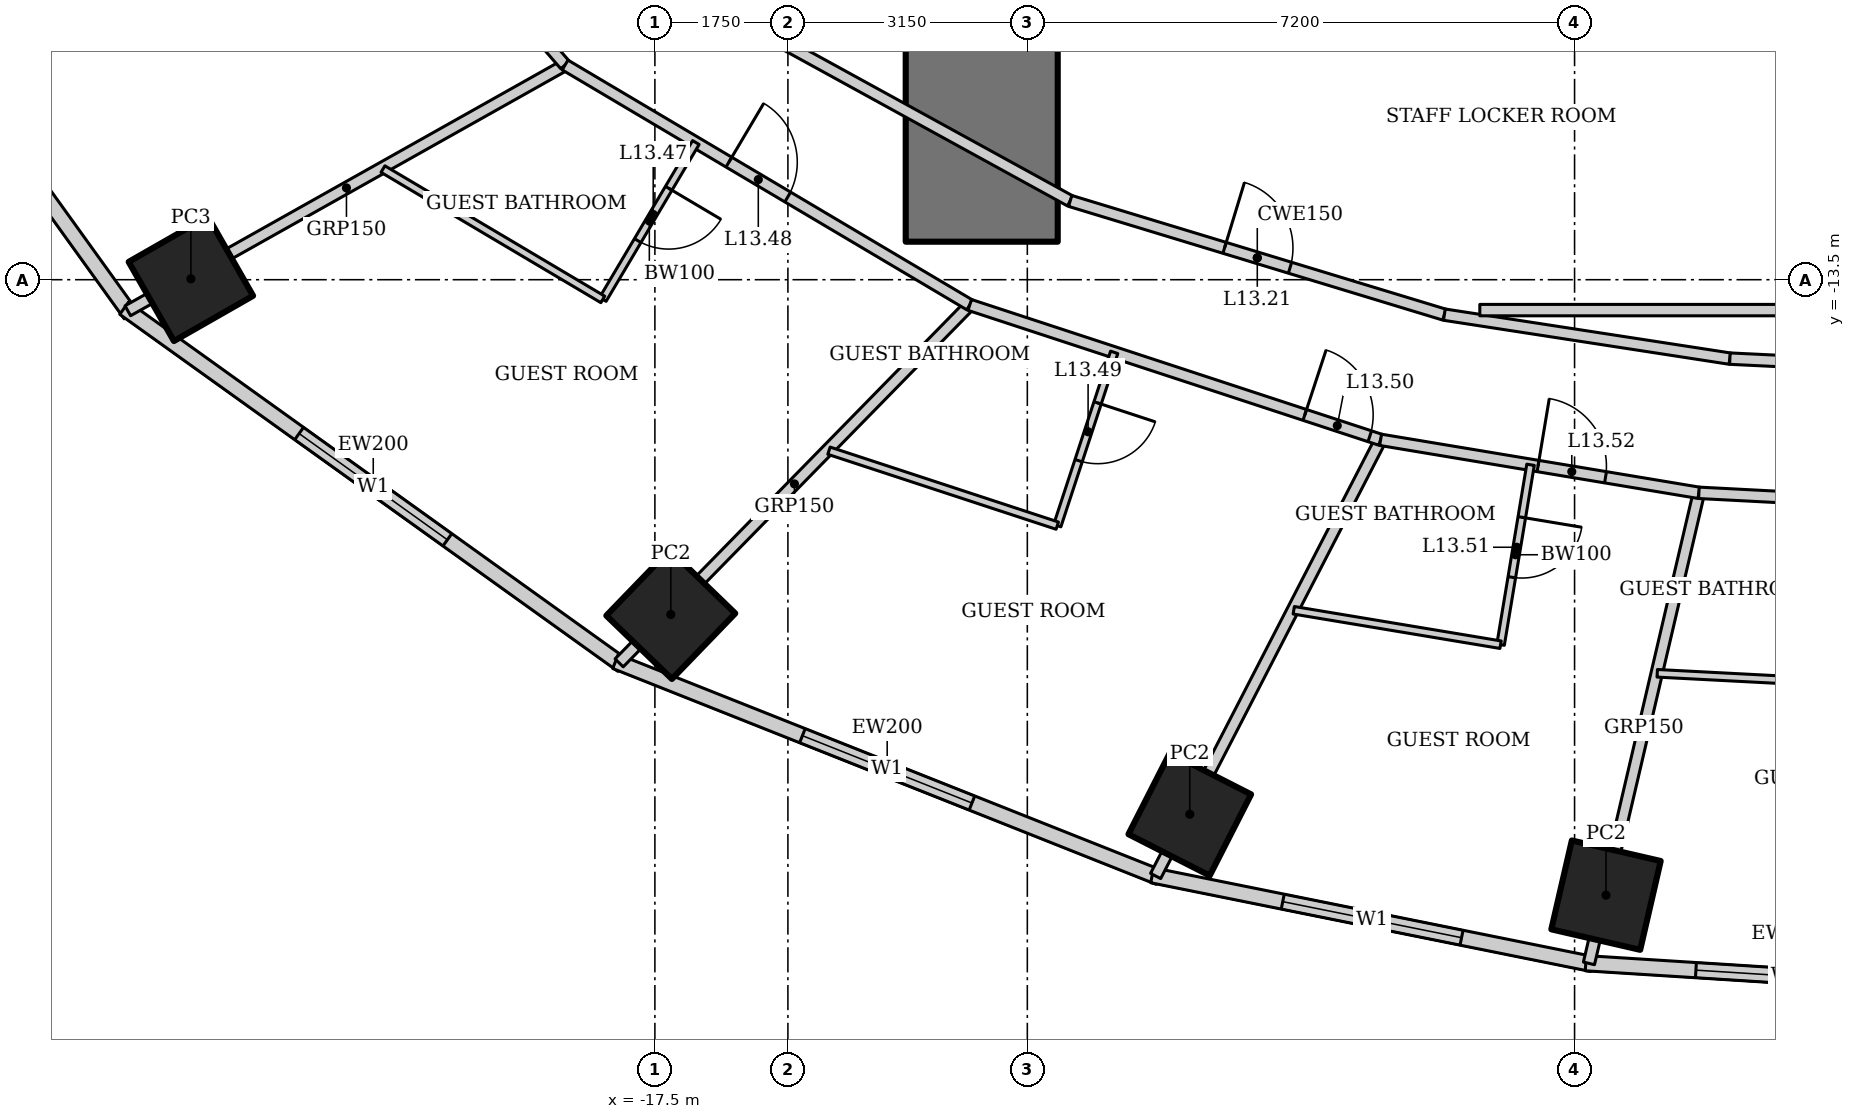
"""IFC4 building model, lengths in metres.
Left out: names, types, materials, properties, quantities, classifications, styles, units other than length and angle.
Written with IfcOpenShell. Run it as: python <this file> out.ifc"""

import sys

from ifc_helpers import new_model, si_unit, direction, frame, frame_2d, origin, origin_2d, place, context, subcontext, project, spatial, rectangle, hollow_rectangle, extrude, element, fill, save


model = new_model("IFC4")
c1 = context("Model", 3, precision=1e-05, world=origin(), true_north=direction((0.0, 1.0)))
c2 = subcontext(c1, "Body", "Model", "MODEL_VIEW")
j1 = project(units=[si_unit("LENGTHUNIT", "METRE"), si_unit("PLANEANGLEUNIT", "RADIAN")], contexts=[c1])
p1 = place(None, origin())
s1 = spatial("IfcSite", under=j1, at=p1, CompositionType="ELEMENT")
p2 = place(p1, origin())
s2 = spatial("IfcBuilding", under=s1, at=p2, CompositionType="ELEMENT")
p3 = place(p2, frame((0.0, 0.0, 62.2)))
s3 = spatial("IfcBuildingStorey", under=s2, at=p3, CompositionType="ELEMENT", Elevation=62.2)
p4 = place(p3, frame((-23.605, -13.489, 0.0), z_axis=(0.0, 0.0, 1.0), x_axis=(0.86824298017, 0.496139221777, 0.0)))
e1 = element("IfcColumn", 1, at=p4, inside=s3, PredefinedType="COLUMN", context=c2, shape_type="SweptSolid", body=[
    extrude(hollow_rectangle(XDim=1.2, YDim=1.2, WallThickness=0.12, at=origin_2d()), origin(), (0.0, 0.0, 1.0), 3.6),
])
for number, where, z_axis, x_axis in (
    (2, (-17.291, -17.905, 0.0), (0.0, 0.0, 1.0), (0.695, 0.719, 0.0)),
    (3, (-10.463, -20.534, 0.0), (0.0, 0.0, 1.0), (0.454, 0.891, 0.0)),
    (4, (-4.986, -21.598, 0.0), (0.0, 0.0, 1.0), (0.225, 0.974, 0.0)),
):
    element("IfcColumn", number, at=place(p3, frame(where, z_axis=z_axis, x_axis=x_axis)), inside=s3, PredefinedType="COLUMN", context=c2, shape_type="SweptSolid", body=[
        extrude(hollow_rectangle(XDim=1.2, YDim=1.2, WallThickness=0.1, at=origin_2d()), origin(), (0.0, 0.0, 1.0), 3.6),
    ])
p5 = place(p3, frame((-13.2, 13.0, 0.0), z_axis=(0.0, 0.0, 1.0), x_axis=(0.0, -1.0, 0.0)))
e5 = element("IfcWall", 5, at=p5, inside=s3, PredefinedType="SHEAR", context=c2, shape_type="SweptSolid", body=[
    extrude(rectangle(XDim=26.0, YDim=2.0, at=frame_2d((13.0, 0.0))), origin(), (0.0, 0.0, 1.0), 3.6),
])
p6 = place(p5, frame((12.1, 0.0, 0.0)))
e6 = element("IfcOpeningElement", 6, at=p6, cuts=e5, PredefinedType="OPENING", context=c2, shape_type="SweptSolid", body=[
    extrude(rectangle(XDim=1.8, YDim=2.1, at=frame_2d((0.9, 1.05))), frame((0.0, 1.01, 0.0), z_axis=(0.0, -1.0, 0.0), x_axis=(1.0, 0.0, 0.0)), (0.0, 0.0, 1.0), 2.02),
])
p7 = place(p3, frame((-29.26, -7.2, 0.0), z_axis=(0.0, 0.0, 1.0), x_axis=(0.583937613703, -0.811798536155, 0.0)))
e7 = element("IfcWall", 7, at=p7, inside=s3, PredefinedType="SOLIDWALL", context=c2, shape_type="SweptSolid", body=[
    extrude(rectangle(XDim=8.323, YDim=0.2, at=frame_2d((4.162, 0.0))), origin(), (0.0, 0.0, 1.0), 3.45),
])
p8 = place(p7, frame((2.961, 0.0, 0.5)))
e8 = element("IfcOpeningElement", 8, at=p8, cuts=e7, PredefinedType="OPENING", context=c2, shape_type="SweptSolid", body=[
    extrude(rectangle(XDim=2.4, YDim=2.2, at=frame_2d((1.2, 1.1))), frame((0.0, 0.11, 0.0), z_axis=(0.0, -1.0, 0.0), x_axis=(1.0, 0.0, 0.0)), (0.0, 0.0, 1.0), 0.22),
])
p9 = place(p3, frame((-24.482, -13.875, 0.0), z_axis=(0.0, 0.0, 1.0), x_axis=(0.812791321576, -0.582554948112, 0.0)))
e9 = element("IfcWall", 9, at=p9, inside=s3, PredefinedType="SOLIDWALL", context=c2, shape_type="SweptSolid", body=[
    extrude(rectangle(XDim=8.063, YDim=0.2, at=frame_2d((4.032, 0.0))), origin(), (0.0, 0.0, 1.0), 3.45),
])
p10 = place(p9, frame((2.832, 0.0, 0.5)))
e10 = element("IfcOpeningElement", 10, at=p10, cuts=e9, PredefinedType="OPENING", context=c2, shape_type="SweptSolid", body=[
    extrude(rectangle(XDim=2.4, YDim=2.2, at=frame_2d((1.2, 1.1))), frame((0.0, 0.11, 0.0), z_axis=(0.0, -1.0, 0.0), x_axis=(1.0, 0.0, 0.0)), (0.0, 0.0, 1.0), 0.22),
])
p11 = place(p3, frame((-18.018, -18.523, 0.0), z_axis=(0.0, 0.0, 1.0), x_axis=(0.929358351251, -0.369178892895, 0.0)))
e11 = element("IfcWall", 11, at=p11, inside=s3, PredefinedType="SOLIDWALL", context=c2, shape_type="SweptSolid", body=[
    extrude(rectangle(XDim=7.692, YDim=0.2, at=frame_2d((3.846, 0.0))), origin(), (0.0, 0.0, 1.0), 3.45),
])
p12 = place(p11, frame((2.646, 0.0, 0.5)))
e12 = element("IfcOpeningElement", 12, at=p12, cuts=e11, PredefinedType="OPENING", context=c2, shape_type="SweptSolid", body=[
    extrude(rectangle(XDim=2.4, YDim=2.2, at=frame_2d((1.2, 1.1))), frame((0.0, 0.11, 0.0), z_axis=(0.0, -1.0, 0.0), x_axis=(1.0, 0.0, 0.0)), (0.0, 0.0, 1.0), 0.22),
])
p13 = place(p3, frame((-10.957, -21.337, 0.0), z_axis=(0.0, 0.0, 1.0), x_axis=(0.980251657452, -0.197754110105, 0.0)))
e13 = element("IfcWall", 13, at=p13, inside=s3, PredefinedType="SOLIDWALL", context=c2, shape_type="SweptSolid", body=[
    extrude(rectangle(XDim=5.904, YDim=0.2, at=frame_2d((2.952, 0.0))), origin(), (0.0, 0.0, 1.0), 3.45),
])
p14 = place(p13, frame((1.752, 0.0, 0.5)))
e14 = element("IfcOpeningElement", 14, at=p14, cuts=e13, PredefinedType="OPENING", context=c2, shape_type="SweptSolid", body=[
    extrude(rectangle(XDim=2.4, YDim=2.2, at=frame_2d((1.2, 1.1))), frame((0.0, 0.11, 0.0), z_axis=(0.0, -1.0, 0.0), x_axis=(1.0, 0.0, 0.0)), (0.0, 0.0, 1.0), 0.22),
])
p15 = place(p3, frame((-5.253, -22.493, 0.0), z_axis=(0.0, 0.0, 1.0), x_axis=(0.998018582375, -0.062919863585, 0.0)))
e15 = element("IfcWall", 15, at=p15, inside=s3, PredefinedType="SOLIDWALL", context=c2, shape_type="SweptSolid", body=[
    extrude(rectangle(XDim=5.304, YDim=0.2, at=frame_2d((2.652, 0.0))), origin(), (0.0, 0.0, 1.0), 3.45),
])
p16 = place(p15, frame((1.452, 0.0, 0.5)))
e16 = element("IfcOpeningElement", 16, at=p16, cuts=e15, PredefinedType="OPENING", context=c2, shape_type="SweptSolid", body=[
    extrude(rectangle(XDim=2.4, YDim=2.2, at=frame_2d((1.2, 1.1))), frame((0.0, 0.11, 0.0), z_axis=(0.0, -1.0, 0.0), x_axis=(1.0, 0.0, 0.0)), (0.0, 0.0, 1.0), 0.22),
])
p17 = place(p3, frame((-24.435, -13.909, 0.0), z_axis=(0.0, 0.0, 1.0), x_axis=(0.871747379892, 0.489955616001, 0.0)))
e17 = element("IfcWall", 17, at=p17, inside=s3, PredefinedType="PARTITIONING", context=c2, shape_type="SweptSolid", body=[
    extrude(rectangle(XDim=6.6, YDim=0.15, at=frame_2d((3.3, 0.0))), origin(), (0.0, 0.0, 1.0), 2.693),
])
p18 = place(p3, frame((-17.97, -18.542, 0.0), z_axis=(0.0, 0.0, 1.0), x_axis=(0.699736251994, 0.714401272147, 0.0)))
e18 = element("IfcWall", 18, at=p18, inside=s3, PredefinedType="PARTITIONING", context=c2, shape_type="SweptSolid", body=[
    extrude(rectangle(XDim=6.593, YDim=0.15, at=frame_2d((3.296, 0.0))), origin(), (0.0, 0.0, 1.0), 2.528),
])
p19 = place(p3, frame((-10.912, -21.346, 0.0), z_axis=(0.0, 0.0, 1.0), x_axis=(0.458384799126, 0.888753833145, 0.0)))
e19 = element("IfcWall", 19, at=p19, inside=s3, PredefinedType="PARTITIONING", context=c2, shape_type="SweptSolid", body=[
    extrude(rectangle(XDim=6.457, YDim=0.15, at=frame_2d((3.229, 0.0))), origin(), (0.0, 0.0, 1.0), 2.528),
])
p20 = place(p3, frame((-5.211, -22.496, 0.0), z_axis=(0.0, 0.0, 1.0), x_axis=(0.227536694087, 0.973769507042, 0.0)))
e20 = element("IfcWall", 20, at=p20, inside=s3, PredefinedType="PARTITIONING", context=c2, shape_type="SweptSolid", body=[
    extrude(rectangle(XDim=6.358, YDim=0.15, at=frame_2d((3.179, 0.0))), origin(), (0.0, 0.0, 1.0), 2.767),
])
p21 = place(p3, frame((-22.976, -5.729, 0.0), z_axis=(0.0, 0.0, 1.0), x_axis=(0.655599989166, -0.755108372491, 0.0)))
e21 = element("IfcWall", 21, at=p21, inside=s3, PredefinedType="PARTITIONING", context=c2, shape_type="SweptSolid", body=[
    extrude(rectangle(XDim=6.551, YDim=0.15, at=frame_2d((3.275, 0.0))), origin(), (0.0, 0.0, 1.0), 3.45),
])
p22 = place(p21, frame((2.1, 0.0, 0.0)))
e22 = element("IfcOpeningElement", 22, at=p22, cuts=e21, PredefinedType="OPENING", context=c2, shape_type="SweptSolid", body=[
    extrude(rectangle(XDim=0.9, YDim=2.1, at=frame_2d((0.45, 1.05))), frame((0.0, 0.085, 0.0), z_axis=(0.0, -1.0, 0.0), x_axis=(1.0, 0.0, 0.0)), (0.0, 0.0, 1.0), 0.17),
])
p23 = place(p3, frame((-18.681, -10.675, 0.0), z_axis=(0.0, 0.0, 1.0), x_axis=(0.860147339762, -0.510045639036, 0.0)))
e23 = element("IfcWall", 23, at=p23, inside=s3, PredefinedType="PARTITIONING", context=c2, shape_type="SweptSolid", body=[
    extrude(rectangle(XDim=6.19, YDim=0.15, at=frame_2d((3.095, 0.0))), origin(), (0.0, 0.0, 1.0), 3.45),
])
p24 = place(p23, frame((2.505, 0.0, 0.0)))
e24 = element("IfcOpeningElement", 24, at=p24, cuts=e23, PredefinedType="OPENING", context=c2, shape_type="SweptSolid", body=[
    extrude(rectangle(XDim=0.9, YDim=2.1, at=frame_2d((0.45, 1.05))), frame((0.0, 0.085, 0.0), z_axis=(0.0, -1.0, 0.0), x_axis=(1.0, 0.0, 0.0)), (0.0, 0.0, 1.0), 0.17),
])
p25 = place(p3, frame((-13.357, -13.832, 0.0), z_axis=(0.0, 0.0, 1.0), x_axis=(0.950106803111, -0.311924770869, 0.0)))
e25 = element("IfcWall", 25, at=p25, inside=s3, PredefinedType="PARTITIONING", context=c2, shape_type="SweptSolid", body=[
    extrude(rectangle(XDim=5.689, YDim=0.15, at=frame_2d((2.845, 0.0))), origin(), (0.0, 0.0, 1.0), 3.45),
])
p26 = place(p25, frame((4.639, 0.0, 0.0)))
e26 = element("IfcOpeningElement", 26, at=p26, cuts=e25, PredefinedType="OPENING", context=c2, shape_type="SweptSolid", body=[
    extrude(rectangle(XDim=0.9, YDim=2.1, at=frame_2d((0.45, 1.05))), frame((0.0, 0.085, 0.0), z_axis=(0.0, -1.0, 0.0), x_axis=(1.0, 0.0, 0.0)), (0.0, 0.0, 1.0), 0.17),
])
p27 = place(p3, frame((-7.952, -15.607, 0.0), z_axis=(0.0, 0.0, 1.0), x_axis=(0.98641101506, -0.164296407044, 0.0)))
e27 = element("IfcWall", 27, at=p27, inside=s3, PredefinedType="PARTITIONING", context=c2, shape_type="SweptSolid", body=[
    extrude(rectangle(XDim=4.245, YDim=0.15, at=frame_2d((2.123, 0.0))), origin(), (0.0, 0.0, 1.0), 3.45),
])
p28 = place(p27, frame((2.1, 0.0, 0.0)))
e28 = element("IfcOpeningElement", 28, at=p28, cuts=e27, PredefinedType="OPENING", context=c2, shape_type="SweptSolid", body=[
    extrude(rectangle(XDim=0.9, YDim=2.1, at=frame_2d((0.45, 1.05))), frame((0.0, 0.085, 0.0), z_axis=(0.0, -1.0, 0.0), x_axis=(1.0, 0.0, 0.0)), (0.0, 0.0, 1.0), 0.17),
])
p29 = place(p3, frame((-3.764, -16.304, 0.0), z_axis=(0.0, 0.0, 1.0), x_axis=(0.998649848759, -0.05194689186, 0.0)))
e29 = element("IfcWall", 29, at=p29, inside=s3, PredefinedType="PARTITIONING", context=c2, shape_type="SweptSolid", body=[
    extrude(rectangle(XDim=3.769, YDim=0.15, at=frame_2d((1.885, 0.0))), origin(), (0.0, 0.0, 1.0), 3.45),
])
p30 = place(p29, frame((2.1, 0.0, 0.0)))
e30 = element("IfcOpeningElement", 30, at=p30, cuts=e29, PredefinedType="OPENING", context=c2, shape_type="SweptSolid", body=[
    extrude(rectangle(XDim=0.9, YDim=2.1, at=frame_2d((0.45, 1.05))), frame((0.0, 0.085, 0.0), z_axis=(0.0, -1.0, 0.0), x_axis=(1.0, 0.0, 0.0)), (0.0, 0.0, 1.0), 0.17),
])
p31 = place(p3, frame((-17.021, -9.726, 0.0), z_axis=(0.0, 0.0, 1.0), x_axis=(0.876522084062, -0.481361647986, 0.0)))
e31 = element("IfcWall", 31, at=p31, inside=s3, PredefinedType="PARTITIONING", context=c2, shape_type="SweptSolid", body=[
    extrude(rectangle(XDim=5.687, YDim=0.15, at=frame_2d((2.844, 0.0))), origin(), (0.0, 0.0, 1.0), 3.45),
])
p32 = place(p3, frame((-12.036, -12.464, 0.0), z_axis=(0.0, 0.0, 1.0), x_axis=(0.956795045135, -0.290763205385, 0.0)))
e32 = element("IfcWall", 32, at=p32, inside=s3, PredefinedType="PARTITIONING", context=c2, shape_type="SweptSolid", body=[
    extrude(rectangle(XDim=5.146, YDim=0.15, at=frame_2d((2.573, 0.0))), origin(), (0.0, 0.0, 1.0), 3.45),
])
p33 = place(p32, frame((2.123, 0.0, 0.0)))
e33 = element("IfcOpeningElement", 33, at=p33, cuts=e32, PredefinedType="OPENING", context=c2, shape_type="SweptSolid", body=[
    extrude(rectangle(XDim=0.9, YDim=2.1, at=frame_2d((0.45, 1.05))), frame((0.0, 0.085, 0.0), z_axis=(0.0, -1.0, 0.0), x_axis=(1.0, 0.0, 0.0)), (0.0, 0.0, 1.0), 0.17),
])
p34 = place(p3, frame((-7.113, -13.96, 0.0), z_axis=(0.0, 0.0, 1.0), x_axis=(0.988343461108, -0.152240608529, 0.0)))
e34 = element("IfcWall", 34, at=p34, inside=s3, PredefinedType="PARTITIONING", context=c2, shape_type="SweptSolid", body=[
    extrude(rectangle(XDim=3.801, YDim=0.15, at=frame_2d((1.9, 0.0))), origin(), (0.0, 0.0, 1.0), 3.45),
])
p35 = place(p3, frame((-3.356, -14.538, 0.0), z_axis=(0.0, 0.0, 1.0), x_axis=(0.998842682549, -0.048096730859, 0.0)))
e35 = element("IfcWall", 35, at=p35, inside=s3, PredefinedType="PARTITIONING", context=c2, shape_type="SweptSolid", body=[
    extrude(rectangle(XDim=3.36, YDim=0.15, at=frame_2d((1.68, 0.0))), origin(), (0.0, 0.0, 1.0), 3.45),
])
p36 = place(p3, frame((-6.647, -13.9, 0.0), z_axis=(0.0, 0.0, 1.0), x_axis=(1.0, 0.0, 0.0)))
e36 = element("IfcWall", 36, at=p36, inside=s3, PredefinedType="PARTITIONING", context=c2, shape_type="SweptSolid", body=[
    extrude(rectangle(XDim=6.647, YDim=0.15, at=frame_2d((3.323, 0.0))), origin(), (0.0, 0.0, 1.0), 3.45),
])
p37 = place(p3, frame((-16.961, -11.695, 0.0), z_axis=(0.0, 0.0, 1.0), x_axis=(-0.510075642074, -0.860129548012, 0.0)))
e37 = element("IfcWall", 37, at=p37, inside=s3, PredefinedType="PARTITIONING", context=c2, shape_type="SweptSolid", body=[
    extrude(rectangle(XDim=2.4, YDim=0.1, at=frame_2d((1.2, 0.0))), origin(), (0.0, 0.0, 1.0), 3.45),
])
p38 = place(p37, frame((0.7, 0.0, 0.0)))
e38 = element("IfcOpeningElement", 38, at=p38, cuts=e37, PredefinedType="OPENING", context=c2, shape_type="SweptSolid", body=[
    extrude(rectangle(XDim=0.8, YDim=2.1, at=frame_2d((0.4, 1.05))), frame((0.0, 0.06, 0.0), z_axis=(0.0, -1.0, 0.0), x_axis=(1.0, 0.0, 0.0)), (0.0, 0.0, 1.0), 0.12),
])
p39 = place(p3, frame((-18.185, -13.76, 0.0), z_axis=(0.0, 0.0, 1.0), x_axis=(-0.860146437071, 0.510047161343, 0.0)))
e39 = element("IfcWall", 39, at=p39, inside=s3, PredefinedType="PARTITIONING", context=c2, shape_type="SweptSolid", body=[
    extrude(rectangle(XDim=3.363, YDim=0.1, at=frame_2d((1.681, 0.0))), origin(), (0.0, 0.0, 1.0), 3.45),
])
p40 = place(p3, frame((-11.457, -14.456, 0.0), z_axis=(0.0, 0.0, 1.0), x_axis=(-0.311890952591, -0.950117905153, 0.0)))
e40 = element("IfcWall", 40, at=p40, inside=s3, PredefinedType="PARTITIONING", context=c2, shape_type="SweptSolid", body=[
    extrude(rectangle(XDim=2.4, YDim=0.1, at=frame_2d((1.2, 0.0))), origin(), (0.0, 0.0, 1.0), 3.45),
])
p41 = place(p40, frame((0.7, 0.0, 0.0)))
e41 = element("IfcOpeningElement", 41, at=p41, cuts=e40, PredefinedType="OPENING", context=c2, shape_type="SweptSolid", body=[
    extrude(rectangle(XDim=0.8, YDim=2.1, at=frame_2d((0.4, 1.05))), frame((0.0, 0.06, 0.0), z_axis=(0.0, -1.0, 0.0), x_axis=(1.0, 0.0, 0.0)), (0.0, 0.0, 1.0), 0.12),
])
p42 = place(p3, frame((-12.206, -16.736, 0.0), z_axis=(0.0, 0.0, 1.0), x_axis=(-0.950109912386, 0.311915300018, 0.0)))
e42 = element("IfcWall", 42, at=p42, inside=s3, PredefinedType="PARTITIONING", context=c2, shape_type="SweptSolid", body=[
    extrude(rectangle(XDim=3.161, YDim=0.1, at=frame_2d((1.581, 0.0))), origin(), (0.0, 0.0, 1.0), 3.45),
])
p43 = place(p3, frame((-5.979, -15.935, 0.0), z_axis=(0.0, 0.0, 1.0), x_axis=(-0.164283516215, -0.986413162067, 0.0)))
e43 = element("IfcWall", 43, at=p43, inside=s3, PredefinedType="PARTITIONING", context=c2, shape_type="SweptSolid", body=[
    extrude(rectangle(XDim=2.4, YDim=0.1, at=frame_2d((1.2, 0.0))), origin(), (0.0, 0.0, 1.0), 2.914),
])
p44 = place(p43, frame((0.7, 0.0, 0.0)))
e44 = element("IfcOpeningElement", 44, at=p44, cuts=e43, PredefinedType="OPENING", context=c2, shape_type="SweptSolid", body=[
    extrude(rectangle(XDim=0.8, YDim=2.1, at=frame_2d((0.4, 1.05))), frame((0.0, 0.06, 0.0), z_axis=(0.0, -1.0, 0.0), x_axis=(1.0, 0.0, 0.0)), (0.0, 0.0, 1.0), 0.12),
])
p45 = place(p3, frame((-6.374, -18.303, 0.0), z_axis=(0.0, 0.0, 1.0), x_axis=(-0.98640348956, 0.164341582641, 0.0)))
e45 = element("IfcWall", 45, at=p45, inside=s3, PredefinedType="PARTITIONING", context=c2, shape_type="SweptSolid", body=[
    extrude(rectangle(XDim=2.759, YDim=0.1, at=frame_2d((1.379, 0.0))), origin(), (0.0, 0.0, 1.0), 3.45),
])
p46 = place(p3, frame((-1.892, -18.805, 0.0), z_axis=(0.0, 0.0, 1.0), x_axis=(-0.998648540987, 0.051972026944, 0.0)))
e46 = element("IfcWall", 46, at=p46, inside=s3, PredefinedType="PARTITIONING", context=c2, shape_type="SweptSolid", body=[
    extrude(rectangle(XDim=2.424, YDim=0.1, at=frame_2d((1.212, 0.0))), origin(), (0.0, 0.0, 1.0), 3.45),
])
p47 = place(p10, origin())
e47 = element("IfcWindow", 47, at=p47, inside=s3, PartitioningType="SINGLE_PANEL", PredefinedType="WINDOW", context=c2, shape_type="SweptSolid", body=[
    extrude(rectangle(XDim=2.4, YDim=2.2, at=frame_2d((1.2, 1.1))), frame((0.0, 0.03, 0.0), z_axis=(0.0, -1.0, 0.0), x_axis=(1.0, 0.0, 0.0)), (0.0, 0.0, 1.0), 0.06),
])
fill(e10, e47)
p48 = place(p12, origin())
e48 = element("IfcWindow", 48, at=p48, inside=s3, PartitioningType="SINGLE_PANEL", PredefinedType="WINDOW", context=c2, shape_type="SweptSolid", body=[
    extrude(rectangle(XDim=2.4, YDim=2.2, at=frame_2d((1.2, 1.1))), frame((0.0, 0.03, 0.0), z_axis=(0.0, -1.0, 0.0), x_axis=(1.0, 0.0, 0.0)), (0.0, 0.0, 1.0), 0.06),
])
fill(e12, e48)
p49 = place(p14, origin())
e49 = element("IfcWindow", 49, at=p49, inside=s3, PartitioningType="SINGLE_PANEL", PredefinedType="WINDOW", context=c2, shape_type="SweptSolid", body=[
    extrude(rectangle(XDim=2.4, YDim=2.2, at=frame_2d((1.2, 1.1))), frame((0.0, 0.03, 0.0), z_axis=(0.0, -1.0, 0.0), x_axis=(1.0, 0.0, 0.0)), (0.0, 0.0, 1.0), 0.06),
])
fill(e14, e49)
p50 = place(p16, origin())
e50 = element("IfcWindow", 50, at=p50, inside=s3, PartitioningType="SINGLE_PANEL", PredefinedType="WINDOW", context=c2, shape_type="SweptSolid", body=[
    extrude(rectangle(XDim=2.4, YDim=2.2, at=frame_2d((1.2, 1.1))), frame((0.0, 0.03, 0.0), z_axis=(0.0, -1.0, 0.0), x_axis=(1.0, 0.0, 0.0)), (0.0, 0.0, 1.0), 0.06),
])
fill(e16, e50)
p51 = place(p33, origin())
e51 = element("IfcDoor", 51, at=p51, inside=s3, OperationType="SINGLE_SWING_LEFT", PredefinedType="DOOR", context=c2, shape_type="SweptSolid", body=[
    extrude(rectangle(XDim=0.9, YDim=2.1, at=frame_2d((0.45, 1.05))), frame((0.0, 0.025, 0.0), z_axis=(0.0, -1.0, 0.0), x_axis=(1.0, 0.0, 0.0)), (0.0, 0.0, 1.0), 0.05),
])
fill(e33, e51)
p52 = place(p38, origin())
e52 = element("IfcDoor", 52, at=p52, inside=s3, OperationType="SINGLE_SWING_LEFT", PredefinedType="DOOR", context=c2, shape_type="SweptSolid", body=[
    extrude(rectangle(XDim=0.8, YDim=2.1, at=frame_2d((0.4, 1.05))), frame((0.0, 0.025, 0.0), z_axis=(0.0, -1.0, 0.0), x_axis=(1.0, 0.0, 0.0)), (0.0, 0.0, 1.0), 0.05),
])
fill(e38, e52)
p53 = place(p24, origin())
e53 = element("IfcDoor", 53, at=p53, inside=s3, OperationType="SINGLE_SWING_LEFT", PredefinedType="DOOR", context=c2, shape_type="SweptSolid", body=[
    extrude(rectangle(XDim=0.9, YDim=2.1, at=frame_2d((0.45, 1.05))), frame((0.0, 0.025, 0.0), z_axis=(0.0, -1.0, 0.0), x_axis=(1.0, 0.0, 0.0)), (0.0, 0.0, 1.0), 0.05),
])
fill(e24, e53)
p54 = place(p41, origin())
e54 = element("IfcDoor", 54, at=p54, inside=s3, OperationType="SINGLE_SWING_LEFT", PredefinedType="DOOR", context=c2, shape_type="SweptSolid", body=[
    extrude(rectangle(XDim=0.8, YDim=2.1, at=frame_2d((0.4, 1.05))), frame((0.0, 0.025, 0.0), z_axis=(0.0, -1.0, 0.0), x_axis=(1.0, 0.0, 0.0)), (0.0, 0.0, 1.0), 0.05),
])
fill(e41, e54)
p55 = place(p26, origin())
e55 = element("IfcDoor", 55, at=p55, inside=s3, OperationType="SINGLE_SWING_LEFT", PredefinedType="DOOR", context=c2, shape_type="SweptSolid", body=[
    extrude(rectangle(XDim=0.9, YDim=2.1, at=frame_2d((0.45, 1.05))), frame((0.0, 0.025, 0.0), z_axis=(0.0, -1.0, 0.0), x_axis=(1.0, 0.0, 0.0)), (0.0, 0.0, 1.0), 0.05),
])
fill(e26, e55)
p56 = place(p44, origin())
e56 = element("IfcDoor", 56, at=p56, inside=s3, OperationType="SINGLE_SWING_LEFT", PredefinedType="DOOR", context=c2, shape_type="SweptSolid", body=[
    extrude(rectangle(XDim=0.8, YDim=2.1, at=frame_2d((0.4, 1.05))), frame((0.0, 0.025, 0.0), z_axis=(0.0, -1.0, 0.0), x_axis=(1.0, 0.0, 0.0)), (0.0, 0.0, 1.0), 0.05),
])
fill(e44, e56)
p57 = place(p28, origin())
e57 = element("IfcDoor", 57, at=p57, inside=s3, OperationType="SINGLE_SWING_LEFT", PredefinedType="DOOR", context=c2, shape_type="SweptSolid", body=[
    extrude(rectangle(XDim=0.9, YDim=2.1, at=frame_2d((0.45, 1.05))), frame((0.0, 0.025, 0.0), z_axis=(0.0, -1.0, 0.0), x_axis=(1.0, 0.0, 0.0)), (0.0, 0.0, 1.0), 0.05),
])
fill(e28, e57)
save(model, sys.argv[1])
